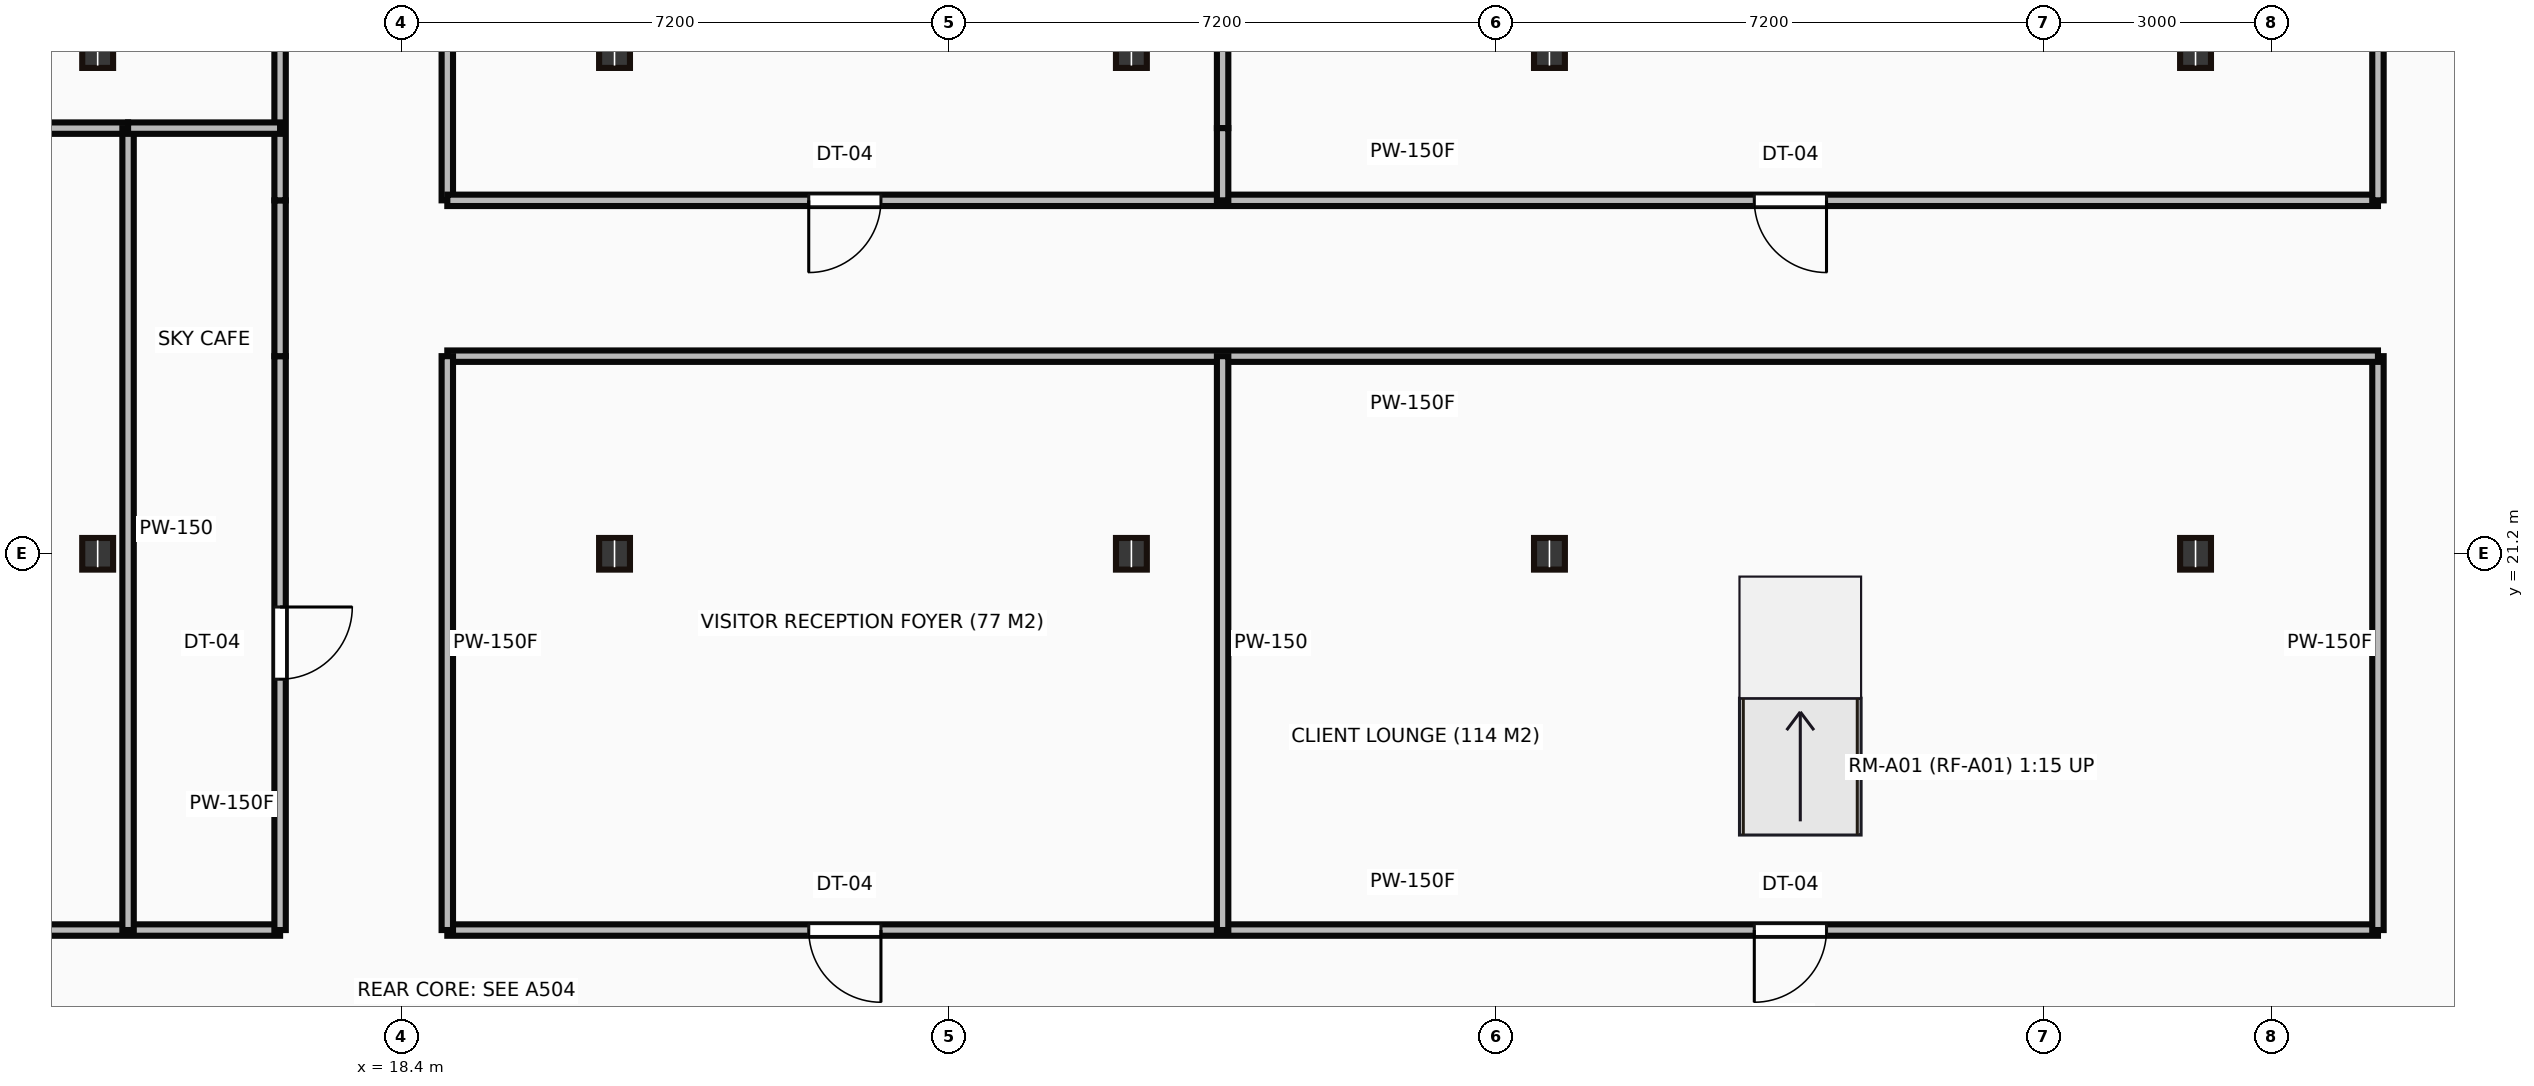
"""IFC4 building model, lengths in metres.
Left out: names, types, materials, properties, quantities, classifications, styles, units other than length and angle.
Written with IfcOpenShell. Run it as: python <this file> out.ifc"""

import sys

from ifc_helpers import new_model, si_unit, direction, frame, frame_2d, origin, origin_2d, place, context, subcontext, project, spatial, rectangle, i_section, extrude, source, transform, mapped, element, fill, save


model = new_model("IFC4")
c1 = context("Model", 3, precision=1e-05, world=origin(), true_north=direction((0.0, 1.0)))
c2 = subcontext(c1, "Body", "Model", "MODEL_VIEW")
j1 = project(units=[si_unit("LENGTHUNIT", "METRE"), si_unit("PLANEANGLEUNIT", "RADIAN")], contexts=[c1])
p1 = place(None, origin())
s1 = spatial("IfcSite", under=j1, at=p1, CompositionType="ELEMENT")
p2 = place(p1, origin())
s2 = spatial("IfcBuilding", under=s1, at=p2, CompositionType="ELEMENT")
p3 = place(p2, frame((0.0, 0.0, 79.95)))
s3 = spatial("IfcBuildingStorey", under=s2, at=p3, CompositionType="ELEMENT", Elevation=79.95)
m1 = source(origin(), c2, "Body", "SweptSolid", [
    extrude(i_section(OverallWidth=0.406, OverallDepth=0.416, WebThickness=0.03, FlangeThickness=0.048, at=origin_2d()), origin(), (0.0, 0.0, 1.0), 4.2),
])
for number, where, z_axis, x_axis in (
    (1, (14.4, 21.2, 0.0), (0.0, 0.0, 1.0), (1.0, 0.0, 0.0)),
    (2, (14.4, 27.8, 0.0), (0.0, 0.0, 1.0), (1.0, 0.0, 0.0)),
    (3, (21.2, 21.2, 0.0), (0.0, 0.0, 1.0), (1.0, 0.0, 0.0)),
    (4, (21.2, 27.8, 0.0), (0.0, 0.0, 1.0), (1.0, 0.0, 0.0)),
    (5, (28.0, 21.2, 0.0), (0.0, 0.0, 1.0), (1.0, 0.0, 0.0)),
    (6, (28.0, 27.8, 0.0), (0.0, 0.0, 1.0), (1.0, 0.0, 0.0)),
    (7, (33.5, 21.2, 0.0), (0.0, 0.0, 1.0), (1.0, 0.0, 0.0)),
    (8, (33.5, 27.8, 0.0), (0.0, 0.0, 1.0), (1.0, 0.0, 0.0)),
    (9, (42.0, 21.2, 0.0), (0.0, 0.0, 1.0), (1.0, 0.0, 0.0)),
    (10, (42.0, 27.8, 0.0), (0.0, 0.0, 1.0), (1.0, 0.0, 0.0)),
):
    element("IfcColumn", number, at=place(p3, frame(where, z_axis=z_axis, x_axis=x_axis)), inside=s3, PredefinedType="COLUMN", context=c2, shape_type="MappedRepresentation", body=[
        mapped(m1, transform((0.0, 0.0, 0.0))),
    ])
m2 = source(origin(), c2, "Body", "SweptSolid", [
    extrude(rectangle(XDim=13.4, YDim=0.15, at=frame_2d((6.7, 0.0))), origin(), (0.0, 0.0, 1.0), 3.9),
])
p4 = place(p3, frame((3.4, 16.25, 0.0), z_axis=(0.0, 0.0, 1.0), x_axis=(1.0, 0.0, 0.0)))
e11 = element("IfcWall", 11, at=p4, inside=s3, PredefinedType="PARTITIONING", context=c2, shape_type="MappedRepresentation", body=[
    mapped(m2, transform((0.0, 0.0, 0.0))),
])
p5 = place(p4, frame((5.355, 0.0, 0.0)))
e12 = element("IfcOpeningElement", 12, at=p5, cuts=e11, PredefinedType="OPENING", context=c2, shape_type="SweptSolid", body=[
    extrude(rectangle(XDim=0.95, YDim=2.15, at=frame_2d((0.475, 1.075))), frame((0.0, 0.085, 0.0), z_axis=(0.0, -1.0, 0.0), x_axis=(1.0, 0.0, 0.0)), (0.0, 0.0, 1.0), 0.17),
])
m3 = source(origin(), c2, "Body", "SweptSolid", [
    extrude(rectangle(XDim=7.55, YDim=0.15, at=frame_2d((3.775, 0.0))), origin(), (0.0, 0.0, 1.0), 3.9),
])
p6 = place(p3, frame((16.8, 16.25, 0.0), z_axis=(0.0, 0.0, 1.0), x_axis=(0.0, 1.0, 0.0)))
e13 = element("IfcWall", 13, at=p6, inside=s3, PredefinedType="PARTITIONING", context=c2, shape_type="MappedRepresentation", body=[
    mapped(m3, transform((0.0, 0.0, 0.0))),
])
p7 = place(p6, frame((3.3, 0.0, 0.0)))
e14 = element("IfcOpeningElement", 14, at=p7, cuts=e13, PredefinedType="OPENING", context=c2, shape_type="SweptSolid", body=[
    extrude(rectangle(XDim=0.95, YDim=2.15, at=frame_2d((0.475, 1.075))), frame((0.0, 0.085, 0.0), z_axis=(0.0, -1.0, 0.0), x_axis=(1.0, 0.0, 0.0)), (0.0, 0.0, 1.0), 0.17),
])
m4 = source(origin(), c2, "Body", "SweptSolid", [
    extrude(rectangle(XDim=2.05, YDim=0.15, at=frame_2d((1.025, 0.0))), origin(), (0.0, 0.0, 1.0), 3.9),
])
p8 = place(p3, frame((16.8, 23.8, 0.0), z_axis=(0.0, 0.0, 1.0), x_axis=(0.0, 1.0, 0.0)))
e15 = element("IfcWall", 15, at=p8, inside=s3, PredefinedType="PARTITIONING", context=c2, shape_type="MappedRepresentation", body=[
    mapped(m4, transform((0.0, 0.0, 0.0))),
])
m5 = source(origin(), c2, "Body", "SweptSolid", [
    extrude(rectangle(XDim=10.15, YDim=0.15, at=frame_2d((5.075, 0.0))), origin(), (0.0, 0.0, 1.0), 3.9),
])
for number, where, z_axis, x_axis in (
    (16, (16.8, 25.85, 0.0), (0.0, 0.0, 1.0), (0.0, 1.0, 0.0)),
    (17, (19.0, 36.0, 0.0), (0.0, 0.0, 1.0), (0.0, -1.0, 0.0)),
):
    element("IfcWall", number, at=place(p3, frame(where, z_axis=z_axis, x_axis=x_axis)), inside=s3, PredefinedType="PARTITIONING", context=c2, shape_type="MappedRepresentation", body=[
        mapped(m5, transform((0.0, 0.0, 0.0))),
    ])
m6 = source(origin(), c2, "Body", "SweptSolid", [
    extrude(rectangle(XDim=25.4, YDim=0.15, at=frame_2d((12.7, 0.0))), origin(), (0.0, 0.0, 1.0), 3.9),
])
p9 = place(p3, frame((19.0, 25.85, 0.0), z_axis=(0.0, 0.0, 1.0), x_axis=(1.0, 0.0, 0.0)))
e18 = element("IfcWall", 18, at=p9, inside=s3, PredefinedType="PARTITIONING", context=c2, shape_type="MappedRepresentation", body=[
    mapped(m6, transform((0.0, 0.0, 0.0))),
])
p10 = place(p9, frame((4.755, 0.0, 0.0)))
e19 = element("IfcOpeningElement", 19, at=p10, cuts=e18, PredefinedType="OPENING", context=c2, shape_type="SweptSolid", body=[
    extrude(rectangle(XDim=0.95, YDim=2.15, at=frame_2d((0.475, 1.075))), frame((0.0, 0.085, 0.0), z_axis=(0.0, -1.0, 0.0), x_axis=(1.0, 0.0, 0.0)), (0.0, 0.0, 1.0), 0.17),
])
p11 = place(p9, frame((17.195, 0.0, 0.0)))
e20 = element("IfcOpeningElement", 20, at=p11, cuts=e18, PredefinedType="OPENING", context=c2, shape_type="SweptSolid", body=[
    extrude(rectangle(XDim=0.95, YDim=2.15, at=frame_2d((0.475, 1.075))), frame((0.0, 0.085, 0.0), z_axis=(0.0, -1.0, 0.0), x_axis=(1.0, 0.0, 0.0)), (0.0, 0.0, 1.0), 0.17),
])
m7 = source(origin(), c2, "Body", "SweptSolid", [
    extrude(rectangle(XDim=9.15, YDim=0.15, at=frame_2d((4.575, 0.0))), origin(), (0.0, 0.0, 1.0), 3.9),
])
p12 = place(p3, frame((44.4, 25.85, 0.0), z_axis=(0.0, 0.0, 1.0), x_axis=(0.0, 1.0, 0.0)))
e21 = element("IfcWall", 21, at=p12, inside=s3, PredefinedType="PARTITIONING", context=c2, shape_type="MappedRepresentation", body=[
    mapped(m7, transform((0.0, 0.0, 0.0))),
])
p13 = place(p3, frame((19.0, 16.25, 0.0), z_axis=(0.0, 0.0, 1.0), x_axis=(1.0, 0.0, 0.0)))
e22 = element("IfcWall", 22, at=p13, inside=s3, PredefinedType="PARTITIONING", context=c2, shape_type="MappedRepresentation", body=[
    mapped(m6, transform((0.0, 0.0, 0.0))),
])
p14 = place(p13, frame((4.755, 0.0, 0.0)))
e23 = element("IfcOpeningElement", 23, at=p14, cuts=e22, PredefinedType="OPENING", context=c2, shape_type="SweptSolid", body=[
    extrude(rectangle(XDim=0.95, YDim=2.15, at=frame_2d((0.475, 1.075))), frame((0.0, 0.085, 0.0), z_axis=(0.0, -1.0, 0.0), x_axis=(1.0, 0.0, 0.0)), (0.0, 0.0, 1.0), 0.17),
])
p15 = place(p13, frame((17.195, 0.0, 0.0)))
e24 = element("IfcOpeningElement", 24, at=p15, cuts=e22, PredefinedType="OPENING", context=c2, shape_type="SweptSolid", body=[
    extrude(rectangle(XDim=0.95, YDim=2.15, at=frame_2d((0.475, 1.075))), frame((0.0, 0.085, 0.0), z_axis=(0.0, -1.0, 0.0), x_axis=(1.0, 0.0, 0.0)), (0.0, 0.0, 1.0), 0.17),
])
p16 = place(p3, frame((44.4, 16.25, 0.0), z_axis=(0.0, 0.0, 1.0), x_axis=(0.0, 1.0, 0.0)))
e25 = element("IfcWall", 25, at=p16, inside=s3, PredefinedType="PARTITIONING", context=c2, shape_type="MappedRepresentation", body=[
    mapped(m3, transform((0.0, 0.0, 0.0))),
])
p17 = place(p3, frame((44.4, 23.8, 0.0), z_axis=(0.0, 0.0, 1.0), x_axis=(-1.0, 0.0, 0.0)))
e26 = element("IfcWall", 26, at=p17, inside=s3, PredefinedType="PARTITIONING", context=c2, shape_type="MappedRepresentation", body=[
    mapped(m6, transform((0.0, 0.0, 0.0))),
])
p18 = place(p3, frame((19.0, 23.8, 0.0), z_axis=(0.0, 0.0, 1.0), x_axis=(0.0, -1.0, 0.0)))
e27 = element("IfcWall", 27, at=p18, inside=s3, PredefinedType="PARTITIONING", context=c2, shape_type="MappedRepresentation", body=[
    mapped(m3, transform((0.0, 0.0, 0.0))),
])
m8 = source(origin(), c2, "Body", "SweptSolid", [
    extrude(rectangle(XDim=14.78, YDim=0.15, at=frame_2d((7.39, 0.0))), origin(), (0.0, 0.0, 1.0), 3.9),
])
p19 = place(p3, frame((0.02, 26.8, 0.0), z_axis=(0.0, 0.0, 1.0), x_axis=(1.0, 0.0, 0.0)))
e28 = element("IfcWall", 28, at=p19, inside=s3, PredefinedType="PARTITIONING", context=c2, shape_type="MappedRepresentation", body=[
    mapped(m8, transform((0.0, 0.0, 0.0))),
])
m9 = source(origin(), c2, "Body", "SweptSolid", [
    extrude(rectangle(XDim=10.55, YDim=0.15, at=frame_2d((5.275, 0.0))), origin(), (0.0, 0.0, 1.0), 3.9),
])
p20 = place(p3, frame((14.8, 26.8, 0.0), z_axis=(0.0, 0.0, 1.0), x_axis=(0.0, -1.0, 0.0)))
e29 = element("IfcWall", 29, at=p20, inside=s3, PredefinedType="PARTITIONING", context=c2, shape_type="MappedRepresentation", body=[
    mapped(m9, transform((0.0, 0.0, 0.0))),
])
m10 = source(origin(), c2, "Body", "SweptSolid", [
    extrude(rectangle(XDim=2.0, YDim=0.15, at=frame_2d((1.0, 0.0))), origin(), (0.0, 0.0, 1.0), 3.9),
])
p21 = place(p3, frame((14.8, 26.8, 0.0), z_axis=(0.0, 0.0, 1.0), x_axis=(1.0, 0.0, 0.0)))
e30 = element("IfcWall", 30, at=p21, inside=s3, PredefinedType="PARTITIONING", context=c2, shape_type="MappedRepresentation", body=[
    mapped(m10, transform((0.0, 0.0, 0.0))),
])
p22 = place(p3, frame((29.2, 23.8, 0.0), z_axis=(0.0, 0.0, 1.0), x_axis=(0.0, -1.0, 0.0)))
e31 = element("IfcWall", 31, at=p22, inside=s3, PredefinedType="PARTITIONING", context=c2, shape_type="MappedRepresentation", body=[
    mapped(m3, transform((0.0, 0.0, 0.0))),
])
m11 = source(origin(), c2, "Body", "SweptSolid", [
    extrude(rectangle(XDim=20.115, YDim=0.15, at=frame_2d((10.058, 0.0))), origin(), (0.0, 0.0, 1.0), 3.9),
])
p23 = place(p3, frame((29.2, 46.915, 0.0), z_axis=(0.0, 0.0, 1.0), x_axis=(0.0, -1.0, 0.0)))
e32 = element("IfcWall", 32, at=p23, inside=s3, PredefinedType="PARTITIONING", context=c2, shape_type="MappedRepresentation", body=[
    mapped(m11, transform((0.0, 0.0, 0.0))),
])
m12 = source(origin(), c2, "Body", "SweptSolid", [
    extrude(rectangle(XDim=0.95, YDim=0.15, at=frame_2d((0.475, 0.0))), origin(), (0.0, 0.0, 1.0), 3.9),
])
p24 = place(p3, frame((29.2, 26.8, 0.0), z_axis=(0.0, 0.0, 1.0), x_axis=(0.0, -1.0, 0.0)))
e33 = element("IfcWall", 33, at=p24, inside=s3, PredefinedType="PARTITIONING", context=c2, shape_type="MappedRepresentation", body=[
    mapped(m12, transform((0.0, 0.0, 0.0))),
])
m13 = source(origin(), c2, "Body", "SweptSolid", [
    extrude(rectangle(XDim=0.95, YDim=2.15, at=frame_2d((0.475, 1.075))), frame((0.0, 0.025, 0.0), z_axis=(0.0, -1.0, 0.0), x_axis=(1.0, 0.0, 0.0)), (0.0, 0.0, 1.0), 0.05),
])
p25 = place(p7, origin())
e34 = element("IfcDoor", 34, at=p25, inside=s3, OperationType="SINGLE_SWING_RIGHT", PredefinedType="DOOR", context=c2, shape_type="MappedRepresentation", body=[
    mapped(m13, transform((0.0, 0.0, 0.0))),
])
fill(e14, e34)
p26 = place(p10, origin())
e35 = element("IfcDoor", 35, at=p26, inside=s3, OperationType="SINGLE_SWING_LEFT", PredefinedType="DOOR", context=c2, shape_type="MappedRepresentation", body=[
    mapped(m13, transform((0.0, 0.0, 0.0))),
])
fill(e19, e35)
p27 = place(p14, origin())
e36 = element("IfcDoor", 36, at=p27, inside=s3, OperationType="SINGLE_SWING_RIGHT", PredefinedType="DOOR", context=c2, shape_type="MappedRepresentation", body=[
    mapped(m13, transform((0.0, 0.0, 0.0))),
])
fill(e23, e36)
p28 = place(p15, origin())
e37 = element("IfcDoor", 37, at=p28, inside=s3, OperationType="SINGLE_SWING_LEFT", PredefinedType="DOOR", context=c2, shape_type="MappedRepresentation", body=[
    mapped(m13, transform((0.0, 0.0, 0.0))),
])
fill(e24, e37)
p29 = place(p11, origin())
e38 = element("IfcDoor", 38, at=p29, inside=s3, OperationType="SINGLE_SWING_RIGHT", PredefinedType="DOOR", context=c2, shape_type="MappedRepresentation", body=[
    mapped(m13, transform((0.0, 0.0, 0.0))),
])
fill(e20, e38)
save(model, sys.argv[1])
